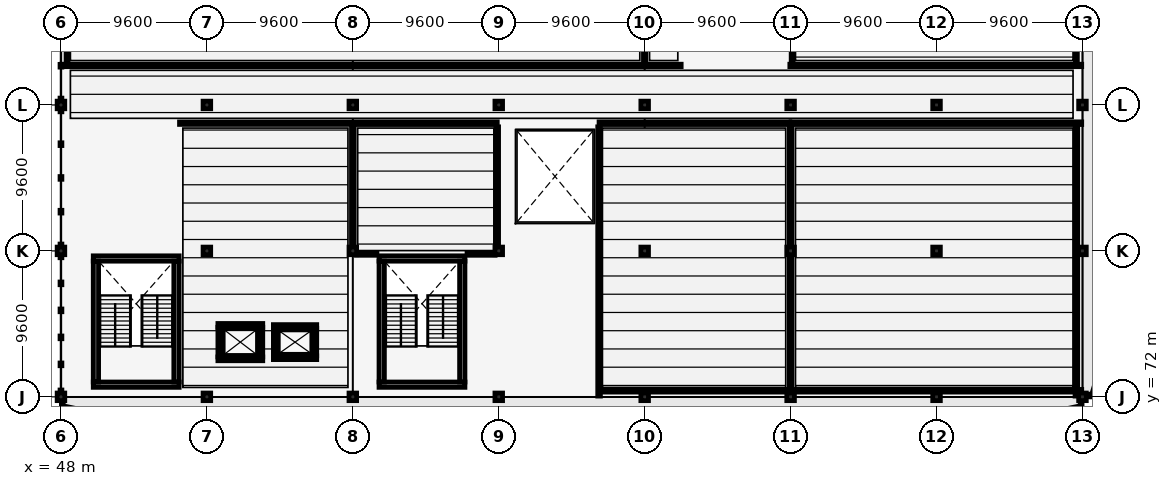
"""IFC4 building model, lengths in metres.
Left out: names, types, materials, properties, quantities, classifications, styles, units other than length and angle.
Written with IfcOpenShell. Run it as: python <this file> out.ifc"""

import sys

from ifc_helpers import new_model, si_unit, direction, frame, frame_2d, origin, origin_2d, place, context, subcontext, project, spatial, rectangle, extrude, element, fill, save


model = new_model("IFC4")
c1 = context("Model", 3, precision=1e-05, world=origin(), true_north=direction((0.0, 1.0)))
c2 = subcontext(c1, "Body", "Model", "MODEL_VIEW")
j1 = project(units=[si_unit("LENGTHUNIT", "METRE"), si_unit("PLANEANGLEUNIT", "RADIAN")], contexts=[c1])
p1 = place(None, origin())
s1 = spatial("IfcSite", under=j1, at=p1, CompositionType="ELEMENT")
p2 = place(p1, origin())
s2 = spatial("IfcBuilding", under=s1, at=p2, CompositionType="ELEMENT")
p3 = place(p2, frame((0.0, 0.0, 9.6)))
s3 = spatial("IfcBuildingStorey", under=s2, at=p3, CompositionType="ELEMENT", Elevation=9.6)
for number, where, z_axis, x_axis in (
    (1, (48.0, 72.0, 0.0), (0.0, 0.0, 1.0), (1.0, 0.0, 0.0)),
    (2, (48.0, 81.6, 0.0), (0.0, 0.0, 1.0), (1.0, 0.0, 0.0)),
    (3, (48.0, 91.2, 0.0), (0.0, 0.0, 1.0), (1.0, 0.0, 0.0)),
    (4, (57.6, 72.0, 0.0), (0.0, 0.0, 1.0), (1.0, 0.0, 0.0)),
    (5, (57.6, 81.6, 0.0), (0.0, 0.0, 1.0), (1.0, 0.0, 0.0)),
    (6, (57.6, 91.2, 0.0), (0.0, 0.0, 1.0), (1.0, 0.0, 0.0)),
    (7, (67.2, 72.0, 0.0), (0.0, 0.0, 1.0), (1.0, 0.0, 0.0)),
    (8, (67.2, 81.6, 0.0), (0.0, 0.0, 1.0), (1.0, 0.0, 0.0)),
    (9, (67.2, 91.2, 0.0), (0.0, 0.0, 1.0), (1.0, 0.0, 0.0)),
    (10, (76.8, 72.0, 0.0), (0.0, 0.0, 1.0), (1.0, 0.0, 0.0)),
    (11, (76.8, 81.6, 0.0), (0.0, 0.0, 1.0), (1.0, 0.0, 0.0)),
    (12, (76.8, 91.2, 0.0), (0.0, 0.0, 1.0), (1.0, 0.0, 0.0)),
    (13, (86.4, 72.0, 0.0), (0.0, 0.0, 1.0), (1.0, 0.0, 0.0)),
    (14, (86.4, 81.6, 0.0), (0.0, 0.0, 1.0), (1.0, 0.0, 0.0)),
    (15, (86.4, 91.2, 0.0), (0.0, 0.0, 1.0), (1.0, 0.0, 0.0)),
    (16, (96.0, 72.0, 0.0), (0.0, 0.0, 1.0), (1.0, 0.0, 0.0)),
    (17, (96.0, 81.6, 0.0), (0.0, 0.0, 1.0), (1.0, 0.0, 0.0)),
    (18, (96.0, 91.2, 0.0), (0.0, 0.0, 1.0), (1.0, 0.0, 0.0)),
    (19, (105.6, 72.0, 0.0), (0.0, 0.0, 1.0), (1.0, 0.0, 0.0)),
    (20, (105.6, 81.6, 0.0), (0.0, 0.0, 1.0), (1.0, 0.0, 0.0)),
    (21, (105.6, 91.2, 0.0), (0.0, 0.0, 1.0), (1.0, 0.0, 0.0)),
    (22, (115.2, 72.0, 0.0), (0.0, 0.0, 1.0), (1.0, 0.0, 0.0)),
    (23, (115.2, 81.6, 0.0), (0.0, 0.0, 1.0), (1.0, 0.0, 0.0)),
    (24, (115.2, 91.2, 0.0), (0.0, 0.0, 1.0), (1.0, 0.0, 0.0)),
):
    element("IfcColumn", number, at=place(p3, frame(where, z_axis=z_axis, x_axis=x_axis)), inside=s3, PredefinedType="COLUMN", context=c2, shape_type="SweptSolid", body=[
        extrude(rectangle(XDim=0.5, YDim=0.5, at=origin_2d()), origin(), (0.0, 0.0, 1.0), 4.5),
    ])
for number, where, z_axis, x_axis in (
    (25, (55.775, 72.8, 0.0), (0.0, 0.0, 1.0), (-1.0, 0.0, 0.0)),
    (26, (50.125, 81.1, 0.0), (0.0, 0.0, 1.0), (1.0, 0.0, 0.0)),
):
    element("IfcWall", number, at=place(p3, frame(where, z_axis=z_axis, x_axis=x_axis)), inside=s3, PredefinedType="SHEAR", context=c2, shape_type="SweptSolid", body=[
        extrude(rectangle(XDim=5.65, YDim=0.35, at=frame_2d((2.825, 0.0))), origin(), (0.0, 0.0, 1.0), 4.25),
    ])
p4 = place(p3, frame((50.3, 72.975, 0.0), z_axis=(0.0, 0.0, 1.0), x_axis=(0.0, 1.0, 0.0)))
e27 = element("IfcWall", 27, at=p4, inside=s3, PredefinedType="SHEAR", context=c2, shape_type="SweptSolid", body=[
    extrude(rectangle(XDim=7.95, YDim=0.35, at=frame_2d((3.975, 0.0))), origin(), (0.0, 0.0, 1.0), 4.25),
])
p5 = place(p3, frame((55.6, 80.925, 0.0), z_axis=(0.0, 0.0, 1.0), x_axis=(0.0, -1.0, 0.0)))
e28 = element("IfcWall", 28, at=p5, inside=s3, PredefinedType="SHEAR", context=c2, shape_type="SweptSolid", body=[
    extrude(rectangle(XDim=7.95, YDim=0.35, at=frame_2d((3.975, 0.0))), origin(), (0.0, 0.0, 1.0), 4.25),
])
p6 = place(p5, frame((5.68, 0.0, 0.0)))
e29 = element("IfcOpeningElement", 29, at=p6, cuts=e28, PredefinedType="OPENING", context=c2, shape_type="SweptSolid", body=[
    extrude(rectangle(XDim=2.05, YDim=2.15, at=frame_2d((1.025, 1.075))), frame((0.0, 0.185, 0.0), z_axis=(0.0, -1.0, 0.0), x_axis=(1.0, 0.0, 0.0)), (0.0, 0.0, 1.0), 0.37),
])
for number, where, z_axis, x_axis in (
    (30, (74.575, 72.8, 0.0), (0.0, 0.0, 1.0), (-1.0, 0.0, 0.0)),
    (31, (68.925, 81.1, 0.0), (0.0, 0.0, 1.0), (1.0, 0.0, 0.0)),
):
    element("IfcWall", number, at=place(p3, frame(where, z_axis=z_axis, x_axis=x_axis)), inside=s3, PredefinedType="SHEAR", context=c2, shape_type="SweptSolid", body=[
        extrude(rectangle(XDim=5.65, YDim=0.35, at=frame_2d((2.825, 0.0))), origin(), (0.0, 0.0, 1.0), 4.25),
    ])
p7 = place(p3, frame((69.1, 72.975, 0.0), z_axis=(0.0, 0.0, 1.0), x_axis=(0.0, 1.0, 0.0)))
e32 = element("IfcWall", 32, at=p7, inside=s3, PredefinedType="SHEAR", context=c2, shape_type="SweptSolid", body=[
    extrude(rectangle(XDim=7.95, YDim=0.35, at=frame_2d((3.975, 0.0))), origin(), (0.0, 0.0, 1.0), 4.25),
])
p8 = place(p3, frame((74.4, 80.925, 0.0), z_axis=(0.0, 0.0, 1.0), x_axis=(0.0, -1.0, 0.0)))
e33 = element("IfcWall", 33, at=p8, inside=s3, PredefinedType="SHEAR", context=c2, shape_type="SweptSolid", body=[
    extrude(rectangle(XDim=7.95, YDim=0.35, at=frame_2d((3.975, 0.0))), origin(), (0.0, 0.0, 1.0), 4.25),
])
p9 = place(p8, frame((5.68, 0.0, 0.0)))
e34 = element("IfcOpeningElement", 34, at=p9, cuts=e33, PredefinedType="OPENING", context=c2, shape_type="SweptSolid", body=[
    extrude(rectangle(XDim=2.05, YDim=2.15, at=frame_2d((1.025, 1.075))), frame((0.0, 0.185, 0.0), z_axis=(0.0, -1.0, 0.0), x_axis=(1.0, 0.0, 0.0)), (0.0, 0.0, 1.0), 0.37),
])
p10 = place(p3, frame((61.275, 74.5, 0.0), z_axis=(0.0, 0.0, 1.0), x_axis=(-1.0, 0.0, 0.0)))
e35 = element("IfcWall", 35, at=p10, inside=s3, PredefinedType="SOLIDWALL", context=c2, shape_type="SweptSolid", body=[
    extrude(rectangle(XDim=2.95, YDim=0.25, at=frame_2d((1.475, 0.0))), origin(), (0.0, 0.0, 1.0), 4.25),
])
p11 = place(p3, frame((58.325, 76.7, 0.0), z_axis=(0.0, 0.0, 1.0), x_axis=(1.0, 0.0, 0.0)))
e36 = element("IfcWall", 36, at=p11, inside=s3, PredefinedType="SOLIDWALL", context=c2, shape_type="SweptSolid", body=[
    extrude(rectangle(XDim=2.95, YDim=0.25, at=frame_2d((1.475, 0.0))), origin(), (0.0, 0.0, 1.0), 4.25),
])
p12 = place(p11, frame((0.925, 0.0, 0.0)))
e37 = element("IfcOpeningElement", 37, at=p12, cuts=e36, PredefinedType="OPENING", context=c2, shape_type="SweptSolid", body=[
    extrude(rectangle(XDim=1.1, YDim=2.15, at=frame_2d((0.55, 1.075))), frame((0.0, 0.135, 0.0), z_axis=(0.0, -1.0, 0.0), x_axis=(1.0, 0.0, 0.0)), (0.0, 0.0, 1.0), 0.27),
])
for number, where, z_axis, x_axis in (
    (38, (58.45, 74.625, 0.0), (0.0, 0.0, 1.0), (0.0, 1.0, 0.0)),
    (39, (61.15, 76.575, 0.0), (0.0, 0.0, 1.0), (0.0, -1.0, 0.0)),
):
    element("IfcWall", number, at=place(p3, frame(where, z_axis=z_axis, x_axis=x_axis)), inside=s3, PredefinedType="SOLIDWALL", context=c2, shape_type="SweptSolid", body=[
        extrude(rectangle(XDim=1.95, YDim=0.25, at=frame_2d((0.975, 0.0))), origin(), (0.0, 0.0, 1.0), 4.25),
    ])
p13 = place(p3, frame((64.825, 74.575, 0.0), z_axis=(0.0, 0.0, 1.0), x_axis=(-1.0, 0.0, 0.0)))
e40 = element("IfcWall", 40, at=p13, inside=s3, PredefinedType="SOLIDWALL", context=c2, shape_type="SweptSolid", body=[
    extrude(rectangle(XDim=2.85, YDim=0.25, at=frame_2d((1.425, 0.0))), origin(), (0.0, 0.0, 1.0), 4.25),
])
p14 = place(p3, frame((61.975, 76.625, 0.0), z_axis=(0.0, 0.0, 1.0), x_axis=(1.0, 0.0, 0.0)))
e41 = element("IfcWall", 41, at=p14, inside=s3, PredefinedType="SOLIDWALL", context=c2, shape_type="SweptSolid", body=[
    extrude(rectangle(XDim=2.85, YDim=0.25, at=frame_2d((1.425, 0.0))), origin(), (0.0, 0.0, 1.0), 4.25),
])
p15 = place(p14, frame((0.875, 0.0, 0.0)))
e42 = element("IfcOpeningElement", 42, at=p15, cuts=e41, PredefinedType="OPENING", context=c2, shape_type="SweptSolid", body=[
    extrude(rectangle(XDim=1.1, YDim=2.15, at=frame_2d((0.55, 1.075))), frame((0.0, 0.135, 0.0), z_axis=(0.0, -1.0, 0.0), x_axis=(1.0, 0.0, 0.0)), (0.0, 0.0, 1.0), 0.27),
])
for number, where, z_axis, x_axis in (
    (43, (62.1, 74.7, 0.0), (0.0, 0.0, 1.0), (0.0, 1.0, 0.0)),
    (44, (64.7, 76.5, 0.0), (0.0, 0.0, 1.0), (0.0, -1.0, 0.0)),
):
    element("IfcWall", number, at=place(p3, frame(where, z_axis=z_axis, x_axis=x_axis)), inside=s3, PredefinedType="SOLIDWALL", context=c2, shape_type="SweptSolid", body=[
        extrude(rectangle(XDim=1.8, YDim=0.25, at=frame_2d((0.9, 0.0))), origin(), (0.0, 0.0, 1.0), 4.25),
    ])
p16 = place(p3, frame((67.2, 81.4, 0.0), z_axis=(0.0, 0.0, 1.0), x_axis=(0.0, 1.0, 0.0)))
e45 = element("IfcWall", 45, at=p16, inside=s3, PredefinedType="PARTITIONING", context=c2, shape_type="SweptSolid", body=[
    extrude(rectangle(XDim=8.5, YDim=0.175, at=frame_2d((4.25, 0.0))), origin(), (0.0, 0.0, 1.0), 3.4),
])
p17 = place(p16, frame((3.75, 0.0, 0.0)))
e46 = element("IfcOpeningElement", 46, at=p17, cuts=e45, PredefinedType="OPENING", context=c2, shape_type="SweptSolid", body=[
    extrude(rectangle(XDim=1.0, YDim=2.15, at=frame_2d((0.5, 1.075))), frame((0.0, 0.097, 0.0), z_axis=(0.0, -1.0, 0.0), x_axis=(1.0, 0.0, 0.0)), (0.0, 0.0, 1.0), 0.195),
])
p18 = place(p3, frame((55.8, 90.0, 0.0), z_axis=(0.0, 0.0, 1.0), x_axis=(1.0, 0.0, 0.0)))
e47 = element("IfcWall", 47, at=p18, inside=s3, PredefinedType="PARTITIONING", context=c2, shape_type="SweptSolid", body=[
    extrude(rectangle(XDim=11.3, YDim=0.16, at=frame_2d((5.65, 0.0))), origin(), (0.0, 0.0, 1.0), 3.4),
])
p19 = place(p18, frame((4.75, 0.0, 0.0)))
e48 = element("IfcOpeningElement", 48, at=p19, cuts=e47, PredefinedType="OPENING", context=c2, shape_type="SweptSolid", body=[
    extrude(rectangle(XDim=1.8, YDim=2.15, at=frame_2d((0.9, 1.075))), frame((0.0, 0.09, 0.0), z_axis=(0.0, -1.0, 0.0), x_axis=(1.0, 0.0, 0.0)), (0.0, 0.0, 1.0), 0.18),
])
p20 = place(p3, frame((67.3, 90.0, 0.0), z_axis=(0.0, 0.0, 1.0), x_axis=(1.0, 0.0, 0.0)))
e49 = element("IfcWall", 49, at=p20, inside=s3, PredefinedType="PARTITIONING", context=c2, shape_type="SweptSolid", body=[
    extrude(rectangle(XDim=9.4, YDim=0.175, at=frame_2d((4.7, 0.0))), origin(), (0.0, 0.0, 1.0), 3.4),
])
p21 = place(p20, frame((4.2, 0.0, 0.0)))
e50 = element("IfcOpeningElement", 50, at=p21, cuts=e49, PredefinedType="OPENING", context=c2, shape_type="SweptSolid", body=[
    extrude(rectangle(XDim=1.0, YDim=2.15, at=frame_2d((0.5, 1.075))), frame((0.0, 0.097, 0.0), z_axis=(0.0, -1.0, 0.0), x_axis=(1.0, 0.0, 0.0)), (0.0, 0.0, 1.0), 0.195),
])
p22 = place(p3, frame((96.0, 72.05, 0.0), z_axis=(0.0, 0.0, 1.0), x_axis=(0.0, 1.0, 0.0)))
e51 = element("IfcWall", 51, at=p22, inside=s3, PredefinedType="PARTITIONING", context=c2, shape_type="SweptSolid", body=[
    extrude(rectangle(XDim=17.85, YDim=0.175, at=frame_2d((8.925, 0.0))), origin(), (0.0, 0.0, 1.0), 3.4),
])
p23 = place(p3, frame((83.4, 90.0, 0.0), z_axis=(0.0, 0.0, 1.0), x_axis=(1.0, 0.0, 0.0)))
e52 = element("IfcWall", 52, at=p23, inside=s3, PredefinedType="PARTITIONING", context=c2, shape_type="SweptSolid", body=[
    extrude(rectangle(XDim=12.55, YDim=0.175, at=frame_2d((6.275, 0.0))), origin(), (0.0, 0.0, 1.0), 3.4),
])
p24 = place(p23, frame((5.775, 0.0, 0.0)))
e53 = element("IfcOpeningElement", 53, at=p24, cuts=e52, PredefinedType="OPENING", context=c2, shape_type="SweptSolid", body=[
    extrude(rectangle(XDim=1.0, YDim=2.15, at=frame_2d((0.5, 1.075))), frame((0.0, 0.097, 0.0), z_axis=(0.0, -1.0, 0.0), x_axis=(1.0, 0.0, 0.0)), (0.0, 0.0, 1.0), 0.195),
])
p25 = place(p3, frame((96.03, 90.0, 0.0), z_axis=(0.0, 0.0, 1.0), x_axis=(1.0, 0.0, 0.0)))
e54 = element("IfcWall", 54, at=p25, inside=s3, PredefinedType="PARTITIONING", context=c2, shape_type="SweptSolid", body=[
    extrude(rectangle(XDim=19.12, YDim=0.175, at=frame_2d((9.56, 0.0))), origin(), (0.0, 0.0, 1.0), 3.4),
])
p26 = place(p25, frame((7.32, 0.0, 0.0)))
e55 = element("IfcOpeningElement", 55, at=p26, cuts=e54, PredefinedType="OPENING", context=c2, shape_type="SweptSolid", body=[
    extrude(rectangle(XDim=1.0, YDim=2.15, at=frame_2d((0.5, 1.075))), frame((0.0, 0.097, 0.0), z_axis=(0.0, -1.0, 0.0), x_axis=(1.0, 0.0, 0.0)), (0.0, 0.0, 1.0), 0.195),
])
p27 = place(p3, frame((86.5, 93.8, 0.0), z_axis=(0.0, 0.0, 1.0), x_axis=(1.0, 0.0, 0.0)))
e56 = element("IfcWall", 56, at=p27, inside=s3, PredefinedType="PARTITIONING", context=c2, shape_type="SweptSolid", body=[
    extrude(rectangle(XDim=2.3, YDim=0.16, at=frame_2d((1.15, 0.0))), origin(), (0.0, 0.0, 1.0), 3.4),
])
p28 = place(p27, frame((0.25, 0.0, 0.0)))
e57 = element("IfcOpeningElement", 57, at=p28, cuts=e56, PredefinedType="OPENING", context=c2, shape_type="SweptSolid", body=[
    extrude(rectangle(XDim=1.8, YDim=2.15, at=frame_2d((0.9, 1.075))), frame((0.0, 0.09, 0.0), z_axis=(0.0, -1.0, 0.0), x_axis=(1.0, 0.0, 0.0)), (0.0, 0.0, 1.0), 0.18),
])
p29 = place(p3, frame((48.05, 93.8, 0.0), z_axis=(0.0, 0.0, 1.0), x_axis=(1.0, 0.0, 0.0)))
e58 = element("IfcWall", 58, at=p29, inside=s3, PredefinedType="PARTITIONING", context=c2, shape_type="SweptSolid", body=[
    extrude(rectangle(XDim=38.25, YDim=0.16, at=frame_2d((19.125, 0.0))), origin(), (0.0, 0.0, 1.0), 3.4),
])
p30 = place(p29, frame((18.4, 0.0, 0.0)))
e59 = element("IfcOpeningElement", 59, at=p30, cuts=e58, PredefinedType="OPENING", context=c2, shape_type="SweptSolid", body=[
    extrude(rectangle(XDim=1.45, YDim=2.2, at=frame_2d((0.725, 1.1))), frame((0.0, 0.09, 0.0), z_axis=(0.0, -1.0, 0.0), x_axis=(1.0, 0.0, 0.0)), (0.0, 0.0, 1.0), 0.18),
])
p31 = place(p3, frame((95.95, 93.8, 0.0), z_axis=(0.0, 0.0, 1.0), x_axis=(1.0, 0.0, 0.0)))
e60 = element("IfcWall", 60, at=p31, inside=s3, PredefinedType="PARTITIONING", context=c2, shape_type="SweptSolid", body=[
    extrude(rectangle(XDim=19.2, YDim=0.16, at=frame_2d((9.6, 0.0))), origin(), (0.0, 0.0, 1.0), 3.4),
])
p32 = place(p31, frame((9.025, 0.0, 0.0)))
e61 = element("IfcOpeningElement", 61, at=p32, cuts=e60, PredefinedType="OPENING", context=c2, shape_type="SweptSolid", body=[
    extrude(rectangle(XDim=1.15, YDim=2.2, at=frame_2d((0.575, 1.1))), frame((0.0, 0.09, 0.0), z_axis=(0.0, -1.0, 0.0), x_axis=(1.0, 0.0, 0.0)), (0.0, 0.0, 1.0), 0.18),
])
p33 = place(p3, frame((86.4, 93.9, 0.0), z_axis=(0.0, 0.0, 1.0), x_axis=(0.0, 1.0, 0.0)))
e62 = element("IfcWall", 62, at=p33, inside=s3, PredefinedType="PARTITIONING", context=c2, shape_type="SweptSolid", body=[
    extrude(rectangle(XDim=24.05, YDim=0.16, at=frame_2d((12.025, 0.0))), origin(), (0.0, 0.0, 1.0), 3.4),
])
p34 = place(p33, frame((11.3, 0.0, 0.0)))
e63 = element("IfcOpeningElement", 63, at=p34, cuts=e62, PredefinedType="OPENING", context=c2, shape_type="SweptSolid", body=[
    extrude(rectangle(XDim=1.45, YDim=2.2, at=frame_2d((0.725, 1.1))), frame((0.0, 0.09, 0.0), z_axis=(0.0, -1.0, 0.0), x_axis=(1.0, 0.0, 0.0)), (0.0, 0.0, 1.0), 0.18),
])
p35 = place(p3, frame((67.44, 81.4, 0.0), z_axis=(0.0, 0.0, 1.0), x_axis=(1.0, 0.0, 0.0)))
e64 = element("IfcWall", 64, at=p35, inside=s3, PredefinedType="PARTITIONING", context=c2, shape_type="SweptSolid", body=[
    extrude(rectangle(XDim=1.345, YDim=0.175, at=frame_2d((0.672, 0.0))), origin(), (0.0, 0.0, 1.0), 3.4),
])
p36 = place(p3, frame((74.715, 81.4, 0.0), z_axis=(0.0, 0.0, 1.0), x_axis=(1.0, 0.0, 0.0)))
e65 = element("IfcWall", 65, at=p36, inside=s3, PredefinedType="PARTITIONING", context=c2, shape_type="SweptSolid", body=[
    extrude(rectangle(XDim=1.845, YDim=0.175, at=frame_2d((0.922, 0.0))), origin(), (0.0, 0.0, 1.0), 3.4),
])
p37 = place(p3, frame((76.7, 81.54, 0.0), z_axis=(0.0, 0.0, 1.0), x_axis=(0.0, 1.0, 0.0)))
e66 = element("IfcWall", 66, at=p37, inside=s3, PredefinedType="PARTITIONING", context=c2, shape_type="SweptSolid", body=[
    extrude(rectangle(XDim=8.22, YDim=0.175, at=frame_2d((4.11, 0.0))), origin(), (0.0, 0.0, 1.0), 3.4),
])
p38 = place(p3, frame((83.54, 72.4, 0.0), z_axis=(0.0, 0.0, 1.0), x_axis=(1.0, 0.0, 0.0)))
e67 = element("IfcWall", 67, at=p38, inside=s3, PredefinedType="PARTITIONING", context=c2, shape_type="SweptSolid", body=[
    extrude(rectangle(XDim=12.41, YDim=0.175, at=frame_2d((6.205, 0.0))), origin(), (0.0, 0.0, 1.0), 3.4),
])
p39 = place(p3, frame((83.4, 72.05, 0.0), z_axis=(0.0, 0.0, 1.0), x_axis=(0.0, 1.0, 0.0)))
e68 = element("IfcWall", 68, at=p39, inside=s3, PredefinedType="PARTITIONING", context=c2, shape_type="SweptSolid", body=[
    extrude(rectangle(XDim=17.71, YDim=0.175, at=frame_2d((8.855, 0.0))), origin(), (0.0, 0.0, 1.0), 3.4),
])
p40 = place(p3, frame((96.09, 72.4, 0.0), z_axis=(0.0, 0.0, 1.0), x_axis=(1.0, 0.0, 0.0)))
e69 = element("IfcWall", 69, at=p40, inside=s3, PredefinedType="PARTITIONING", context=c2, shape_type="SweptSolid", body=[
    extrude(rectangle(XDim=19.06, YDim=0.175, at=frame_2d((9.53, 0.0))), origin(), (0.0, 0.0, 1.0), 3.4),
])
p41 = place(p3, frame((114.8, 72.05, 0.0), z_axis=(0.0, 0.0, 1.0), x_axis=(0.0, 1.0, 0.0)))
e70 = element("IfcWall", 70, at=p41, inside=s3, PredefinedType="PARTITIONING", context=c2, shape_type="SweptSolid", body=[
    extrude(rectangle(XDim=17.71, YDim=0.175, at=frame_2d((8.855, 0.0))), origin(), (0.0, 0.0, 1.0), 3.4),
])
p42 = place(p3, frame((48.4, 94.04, 0.0), z_axis=(0.0, 0.0, 1.0), x_axis=(0.0, 1.0, 0.0)))
e71 = element("IfcWall", 71, at=p42, inside=s3, PredefinedType="PARTITIONING", context=c2, shape_type="SweptSolid", body=[
    extrude(rectangle(XDim=23.91, YDim=0.125, at=frame_2d((11.955, 0.0))), origin(), (0.0, 0.0, 1.0), 3.4),
])
for number, where, z_axis, x_axis in (
    (72, (96.1, 94.04, 0.0), (0.0, 0.0, 1.0), (0.0, 1.0, 0.0)),
    (73, (114.8, 94.04, 0.0), (0.0, 0.0, 1.0), (0.0, 1.0, 0.0)),
):
    element("IfcWall", number, at=place(p3, frame(where, z_axis=z_axis, x_axis=x_axis)), inside=s3, PredefinedType="PARTITIONING", context=c2, shape_type="SweptSolid", body=[
        extrude(rectangle(XDim=12.62, YDim=0.125, at=frame_2d((6.31, 0.0))), origin(), (0.0, 0.0, 1.0), 3.4),
    ])
p43 = place(p6, origin())
e74 = element("IfcDoor", 74, at=p43, inside=s3, OperationType="DOUBLE_DOOR_SINGLE_SWING", PredefinedType="DOOR", context=c2, shape_type="SweptSolid", body=[
    extrude(rectangle(XDim=2.05, YDim=2.15, at=frame_2d((1.025, 1.075))), frame((0.0, 0.025, 0.0), z_axis=(0.0, -1.0, 0.0), x_axis=(1.0, 0.0, 0.0)), (0.0, 0.0, 1.0), 0.05),
])
fill(e29, e74)
p44 = place(p9, origin())
e75 = element("IfcDoor", 75, at=p44, inside=s3, OperationType="DOUBLE_DOOR_SINGLE_SWING", PredefinedType="DOOR", context=c2, shape_type="SweptSolid", body=[
    extrude(rectangle(XDim=2.05, YDim=2.15, at=frame_2d((1.025, 1.075))), frame((0.0, 0.025, 0.0), z_axis=(0.0, -1.0, 0.0), x_axis=(1.0, 0.0, 0.0)), (0.0, 0.0, 1.0), 0.05),
])
fill(e34, e75)
p45 = place(p12, origin())
e76 = element("IfcDoor", 76, at=p45, inside=s3, OperationType="DOUBLE_DOOR_SLIDING", PredefinedType="DOOR", context=c2, shape_type="SweptSolid", body=[
    extrude(rectangle(XDim=1.1, YDim=2.15, at=frame_2d((0.55, 1.075))), frame((0.0, 0.025, 0.0), z_axis=(0.0, -1.0, 0.0), x_axis=(1.0, 0.0, 0.0)), (0.0, 0.0, 1.0), 0.05),
])
fill(e37, e76)
p46 = place(p15, origin())
e77 = element("IfcDoor", 77, at=p46, inside=s3, OperationType="DOUBLE_DOOR_SLIDING", PredefinedType="DOOR", context=c2, shape_type="SweptSolid", body=[
    extrude(rectangle(XDim=1.1, YDim=2.15, at=frame_2d((0.55, 1.075))), frame((0.0, 0.025, 0.0), z_axis=(0.0, -1.0, 0.0), x_axis=(1.0, 0.0, 0.0)), (0.0, 0.0, 1.0), 0.05),
])
fill(e42, e77)
p47 = place(p17, origin())
e78 = element("IfcDoor", 78, at=p47, inside=s3, OperationType="SINGLE_SWING_LEFT", PredefinedType="DOOR", context=c2, shape_type="SweptSolid", body=[
    extrude(rectangle(XDim=1.0, YDim=2.15, at=frame_2d((0.5, 1.075))), frame((0.0, 0.025, 0.0), z_axis=(0.0, -1.0, 0.0), x_axis=(1.0, 0.0, 0.0)), (0.0, 0.0, 1.0), 0.05),
])
fill(e46, e78)
p48 = place(p19, origin())
e79 = element("IfcDoor", 79, at=p48, inside=s3, OperationType="DOUBLE_DOOR_SINGLE_SWING", PredefinedType="DOOR", context=c2, shape_type="SweptSolid", body=[
    extrude(rectangle(XDim=1.8, YDim=2.15, at=frame_2d((0.9, 1.075))), frame((0.0, 0.025, 0.0), z_axis=(0.0, -1.0, 0.0), x_axis=(1.0, 0.0, 0.0)), (0.0, 0.0, 1.0), 0.05),
])
fill(e48, e79)
p49 = place(p21, origin())
e80 = element("IfcDoor", 80, at=p49, inside=s3, OperationType="SINGLE_SWING_LEFT", PredefinedType="DOOR", context=c2, shape_type="SweptSolid", body=[
    extrude(rectangle(XDim=1.0, YDim=2.15, at=frame_2d((0.5, 1.075))), frame((0.0, 0.025, 0.0), z_axis=(0.0, -1.0, 0.0), x_axis=(1.0, 0.0, 0.0)), (0.0, 0.0, 1.0), 0.05),
])
fill(e50, e80)
p50 = place(p24, origin())
e81 = element("IfcDoor", 81, at=p50, inside=s3, OperationType="SINGLE_SWING_RIGHT", PredefinedType="DOOR", context=c2, shape_type="SweptSolid", body=[
    extrude(rectangle(XDim=1.0, YDim=2.15, at=frame_2d((0.5, 1.075))), frame((0.0, 0.025, 0.0), z_axis=(0.0, -1.0, 0.0), x_axis=(1.0, 0.0, 0.0)), (0.0, 0.0, 1.0), 0.05),
])
fill(e53, e81)
p51 = place(p26, origin())
e82 = element("IfcDoor", 82, at=p51, inside=s3, OperationType="SINGLE_SWING_LEFT", PredefinedType="DOOR", context=c2, shape_type="SweptSolid", body=[
    extrude(rectangle(XDim=1.0, YDim=2.15, at=frame_2d((0.5, 1.075))), frame((0.0, 0.025, 0.0), z_axis=(0.0, -1.0, 0.0), x_axis=(1.0, 0.0, 0.0)), (0.0, 0.0, 1.0), 0.05),
])
fill(e55, e82)
p52 = place(p28, origin())
e83 = element("IfcDoor", 83, at=p52, inside=s3, OperationType="DOUBLE_DOOR_SINGLE_SWING", PredefinedType="DOOR", context=c2, shape_type="SweptSolid", body=[
    extrude(rectangle(XDim=1.8, YDim=2.15, at=frame_2d((0.9, 1.075))), frame((0.0, 0.025, 0.0), z_axis=(0.0, -1.0, 0.0), x_axis=(1.0, 0.0, 0.0)), (0.0, 0.0, 1.0), 0.05),
])
fill(e57, e83)
p53 = place(p30, origin())
e84 = element("IfcDoor", 84, at=p53, inside=s3, OperationType="DOUBLE_DOOR_SINGLE_SWING", PredefinedType="DOOR", context=c2, shape_type="SweptSolid", body=[
    extrude(rectangle(XDim=1.45, YDim=2.2, at=frame_2d((0.725, 1.1))), frame((0.0, 0.025, 0.0), z_axis=(0.0, -1.0, 0.0), x_axis=(1.0, 0.0, 0.0)), (0.0, 0.0, 1.0), 0.05),
])
fill(e59, e84)
p54 = place(p32, origin())
e85 = element("IfcDoor", 85, at=p54, inside=s3, OperationType="SINGLE_SWING_RIGHT", PredefinedType="DOOR", context=c2, shape_type="SweptSolid", body=[
    extrude(rectangle(XDim=1.15, YDim=2.2, at=frame_2d((0.575, 1.1))), frame((0.0, 0.025, 0.0), z_axis=(0.0, -1.0, 0.0), x_axis=(1.0, 0.0, 0.0)), (0.0, 0.0, 1.0), 0.05),
])
fill(e61, e85)
save(model, sys.argv[1])
